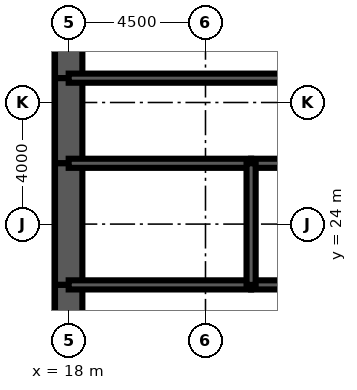
"""IFC4 building model, lengths in metres.
Left out: names, types, materials, properties, quantities, classifications, styles, units other than length and angle.
Written with IfcOpenShell. Run it as: python <this file> out.ifc"""

import sys

from ifc_helpers import new_model, si_unit, direction, frame, frame_2d, origin, place, context, subcontext, project, spatial, rectangle, extrude, element, fill, save


model = new_model("IFC4")
c1 = context("Model", 3, precision=1e-05, world=origin(), true_north=direction((0.0, 1.0)))
c2 = subcontext(c1, "Body", "Model", "MODEL_VIEW")
j1 = project(units=[si_unit("LENGTHUNIT", "METRE"), si_unit("PLANEANGLEUNIT", "RADIAN")], contexts=[c1])
p1 = place(None, origin())
s1 = spatial("IfcSite", under=j1, at=p1, CompositionType="ELEMENT")
p2 = place(p1, origin())
s2 = spatial("IfcBuilding", under=s1, at=p2, CompositionType="ELEMENT")
p3 = place(p2, frame((0.0, 0.0, 63.5)))
s3 = spatial("IfcBuildingStorey", under=s2, at=p3, CompositionType="ELEMENT", Elevation=63.5)
p4 = place(p3, frame((18.0, 32.0, 0.0), z_axis=(0.0, 0.0, 1.0), x_axis=(0.0, -1.0, 0.0)))
e1 = element("IfcWall", 1, at=p4, inside=s3, PredefinedType="SHEAR", context=c2, shape_type="SweptSolid", body=[
    extrude(rectangle(XDim=3.2, YDim=0.9, at=frame_2d((1.6, 0.0))), origin(), (0.0, 0.0, 1.0), 4.5),
])
p5 = place(p3, frame((18.0, 28.8, 0.0), z_axis=(0.0, 0.0, 1.0), x_axis=(0.0, -1.0, 0.0)))
e2 = element("IfcWall", 2, at=p5, inside=s3, PredefinedType="SHEAR", context=c2, shape_type="SweptSolid", body=[
    extrude(rectangle(XDim=2.8, YDim=0.9, at=frame_2d((1.4, 0.0))), origin(), (0.0, 0.0, 1.0), 4.5),
])
p6 = place(p5, frame((0.4, 0.0, 0.0)))
e3 = element("IfcOpeningElement", 3, at=p6, cuts=e2, PredefinedType="OPENING", context=c2, shape_type="SweptSolid", body=[
    extrude(rectangle(XDim=1.8, YDim=2.1, at=frame_2d((0.9, 1.05))), frame((0.0, 0.46, 0.0), z_axis=(0.0, -1.0, 0.0), x_axis=(1.0, 0.0, 0.0)), (0.0, 0.0, 1.0), 0.92),
])
p7 = place(p3, frame((18.0, 26.0, 0.0), z_axis=(0.0, 0.0, 1.0), x_axis=(0.0, -1.0, 0.0)))
e4 = element("IfcWall", 4, at=p7, inside=s3, PredefinedType="SHEAR", context=c2, shape_type="SweptSolid", body=[
    extrude(rectangle(XDim=4.0, YDim=0.9, at=frame_2d((2.0, 0.0))), origin(), (0.0, 0.0, 1.0), 4.5),
])
p8 = place(p3, frame((18.0, 22.0, 0.0), z_axis=(0.0, 0.0, 1.0), x_axis=(0.0, -1.0, 0.0)))
e5 = element("IfcWall", 5, at=p8, inside=s3, PredefinedType="SHEAR", context=c2, shape_type="SweptSolid", body=[
    extrude(rectangle(XDim=2.8, YDim=0.9, at=frame_2d((1.4, 0.0))), origin(), (0.0, 0.0, 1.0), 4.5),
])
p9 = place(p8, frame((0.6, 0.0, 0.0)))
e6 = element("IfcOpeningElement", 6, at=p9, cuts=e5, PredefinedType="OPENING", context=c2, shape_type="SweptSolid", body=[
    extrude(rectangle(XDim=1.8, YDim=2.1, at=frame_2d((0.9, 1.05))), frame((0.0, 0.46, 0.0), z_axis=(0.0, -1.0, 0.0), x_axis=(1.0, 0.0, 0.0)), (0.0, 0.0, 1.0), 0.92),
])
p10 = place(p3, frame((18.0, 28.8, 0.0), z_axis=(0.0, 0.0, 1.0), x_axis=(1.0, 0.0, 0.0)))
e7 = element("IfcWall", 7, at=p10, inside=s3, PredefinedType="SOLIDWALL", context=c2, shape_type="SweptSolid", body=[
    extrude(rectangle(XDim=9.0, YDim=0.3, at=frame_2d((4.5, 0.0))), origin(), (0.0, 0.0, 1.0), 4.5),
])
p11 = place(p10, frame((0.65, 0.0, 0.0)))
e8 = element("IfcOpeningElement", 8, at=p11, cuts=e7, PredefinedType="OPENING", context=c2, shape_type="SweptSolid", body=[
    extrude(rectangle(XDim=1.0, YDim=2.1, at=frame_2d((0.5, 1.05))), frame((0.0, 0.16, 0.0), z_axis=(0.0, -1.0, 0.0), x_axis=(1.0, 0.0, 0.0)), (0.0, 0.0, 1.0), 0.32),
])
p12 = place(p3, frame((18.0, 22.0, 0.0), z_axis=(0.0, 0.0, 1.0), x_axis=(1.0, 0.0, 0.0)))
e9 = element("IfcWall", 9, at=p12, inside=s3, PredefinedType="SOLIDWALL", context=c2, shape_type="SweptSolid", body=[
    extrude(rectangle(XDim=6.0, YDim=0.3, at=frame_2d((3.0, 0.0))), origin(), (0.0, 0.0, 1.0), 4.5),
])
p13 = place(p12, frame((2.0, 0.0, 0.0)))
e10 = element("IfcOpeningElement", 10, at=p13, cuts=e9, PredefinedType="OPENING", context=c2, shape_type="SweptSolid", body=[
    extrude(rectangle(XDim=1.0, YDim=2.1, at=frame_2d((0.5, 1.05))), frame((0.0, 0.16, 0.0), z_axis=(0.0, -1.0, 0.0), x_axis=(1.0, 0.0, 0.0)), (0.0, 0.0, 1.0), 0.32),
])
p14 = place(p3, frame((24.0, 22.0, 0.0), z_axis=(0.0, 0.0, 1.0), x_axis=(1.0, 0.0, 0.0)))
e11 = element("IfcWall", 11, at=p14, inside=s3, PredefinedType="SOLIDWALL", context=c2, shape_type="SweptSolid", body=[
    extrude(rectangle(XDim=3.0, YDim=0.3, at=frame_2d((1.5, 0.0))), origin(), (0.0, 0.0, 1.0), 4.5),
])
p15 = place(p14, frame((1.0, 0.0, 0.0)))
e12 = element("IfcOpeningElement", 12, at=p15, cuts=e11, PredefinedType="OPENING", context=c2, shape_type="SweptSolid", body=[
    extrude(rectangle(XDim=1.0, YDim=2.1, at=frame_2d((0.5, 1.05))), frame((0.0, 0.16, 0.0), z_axis=(0.0, -1.0, 0.0), x_axis=(1.0, 0.0, 0.0)), (0.0, 0.0, 1.0), 0.32),
])
p16 = place(p3, frame((18.0, 26.0, 0.0), z_axis=(0.0, 0.0, 1.0), x_axis=(1.0, 0.0, 0.0)))
e13 = element("IfcWall", 13, at=p16, inside=s3, PredefinedType="SOLIDWALL", context=c2, shape_type="SweptSolid", body=[
    extrude(rectangle(XDim=6.0, YDim=0.3, at=frame_2d((3.0, 0.0))), origin(), (0.0, 0.0, 1.0), 4.5),
])
p17 = place(p3, frame((24.0, 26.0, 0.0), z_axis=(0.0, 0.0, 1.0), x_axis=(1.0, 0.0, 0.0)))
e14 = element("IfcWall", 14, at=p17, inside=s3, PredefinedType="SOLIDWALL", context=c2, shape_type="SweptSolid", body=[
    extrude(rectangle(XDim=3.0, YDim=0.3, at=frame_2d((1.5, 0.0))), origin(), (0.0, 0.0, 1.0), 4.5),
])
p18 = place(p3, frame((24.0, 22.0, 0.0), z_axis=(0.0, 0.0, 1.0), x_axis=(0.0, 1.0, 0.0)))
e15 = element("IfcWall", 15, at=p18, inside=s3, PredefinedType="SOLIDWALL", context=c2, shape_type="SweptSolid", body=[
    extrude(rectangle(XDim=4.0, YDim=0.3, at=frame_2d((2.0, 0.0))), origin(), (0.0, 0.0, 1.0), 4.5),
])
p19 = place(p3, frame((22.2, 26.15, 0.0), z_axis=(0.0, 0.0, 1.0), x_axis=(0.0, 1.0, 0.0)))
e16 = element("IfcWall", 16, at=p19, inside=s3, PredefinedType="PARTITIONING", context=c2, shape_type="SweptSolid", body=[
    extrude(rectangle(XDim=2.5, YDim=0.15, at=frame_2d((1.25, 0.0))), origin(), (0.0, 0.0, 1.0), 3.0),
])
p20 = place(p19, frame((0.35, 0.0, 0.0)))
e17 = element("IfcOpeningElement", 17, at=p20, cuts=e16, PredefinedType="OPENING", context=c2, shape_type="SweptSolid", body=[
    extrude(rectangle(XDim=1.0, YDim=2.1, at=frame_2d((0.5, 1.05))), frame((0.0, 0.085, 0.0), z_axis=(0.0, -1.0, 0.0), x_axis=(1.0, 0.0, 0.0)), (0.0, 0.0, 1.0), 0.17),
])
p21 = place(p20, origin())
e18 = element("IfcDoor", 18, at=p21, inside=s3, OperationType="SINGLE_SWING_LEFT", PredefinedType="DOOR", context=c2, shape_type="SweptSolid", body=[
    extrude(rectangle(XDim=1.0, YDim=2.1, at=frame_2d((0.5, 1.05))), frame((0.0, 0.025, 0.0), z_axis=(0.0, -1.0, 0.0), x_axis=(1.0, 0.0, 0.0)), (0.0, 0.0, 1.0), 0.05),
])
fill(e17, e18)
p22 = place(p11, origin())
e19 = element("IfcDoor", 19, at=p22, inside=s3, OperationType="SINGLE_SWING_LEFT", PredefinedType="DOOR", context=c2, shape_type="SweptSolid", body=[
    extrude(rectangle(XDim=1.0, YDim=2.1, at=frame_2d((0.5, 1.05))), frame((0.0, 0.025, 0.0), z_axis=(0.0, -1.0, 0.0), x_axis=(1.0, 0.0, 0.0)), (0.0, 0.0, 1.0), 0.05),
])
fill(e8, e19)
p23 = place(p9, origin())
e20 = element("IfcDoor", 20, at=p23, inside=s3, OperationType="SINGLE_SWING_LEFT", PredefinedType="DOOR", context=c2, shape_type="SweptSolid", body=[
    extrude(rectangle(XDim=1.8, YDim=2.1, at=frame_2d((0.9, 1.05))), frame((0.0, 0.45, 0.0), z_axis=(0.0, -1.0, 0.0), x_axis=(1.0, 0.0, 0.0)), (0.0, 0.0, 1.0), 0.899),
])
fill(e6, e20)
p24 = place(p6, origin())
e21 = element("IfcDoor", 21, at=p24, inside=s3, OperationType="SINGLE_SWING_LEFT", PredefinedType="DOOR", context=c2, shape_type="SweptSolid", body=[
    extrude(rectangle(XDim=1.8, YDim=2.1, at=frame_2d((0.9, 1.05))), frame((0.0, 0.45, 0.0), z_axis=(0.0, -1.0, 0.0), x_axis=(1.0, 0.0, 0.0)), (0.0, 0.0, 1.0), 0.899),
])
fill(e3, e21)
p25 = place(p13, origin())
e22 = element("IfcDoor", 22, at=p25, inside=s3, OperationType="SINGLE_SWING_LEFT", PredefinedType="DOOR", context=c2, shape_type="SweptSolid", body=[
    extrude(rectangle(XDim=1.0, YDim=2.1, at=frame_2d((0.5, 1.05))), frame((0.0, 0.025, 0.0), z_axis=(0.0, -1.0, 0.0), x_axis=(1.0, 0.0, 0.0)), (0.0, 0.0, 1.0), 0.05),
])
fill(e10, e22)
save(model, sys.argv[1])
